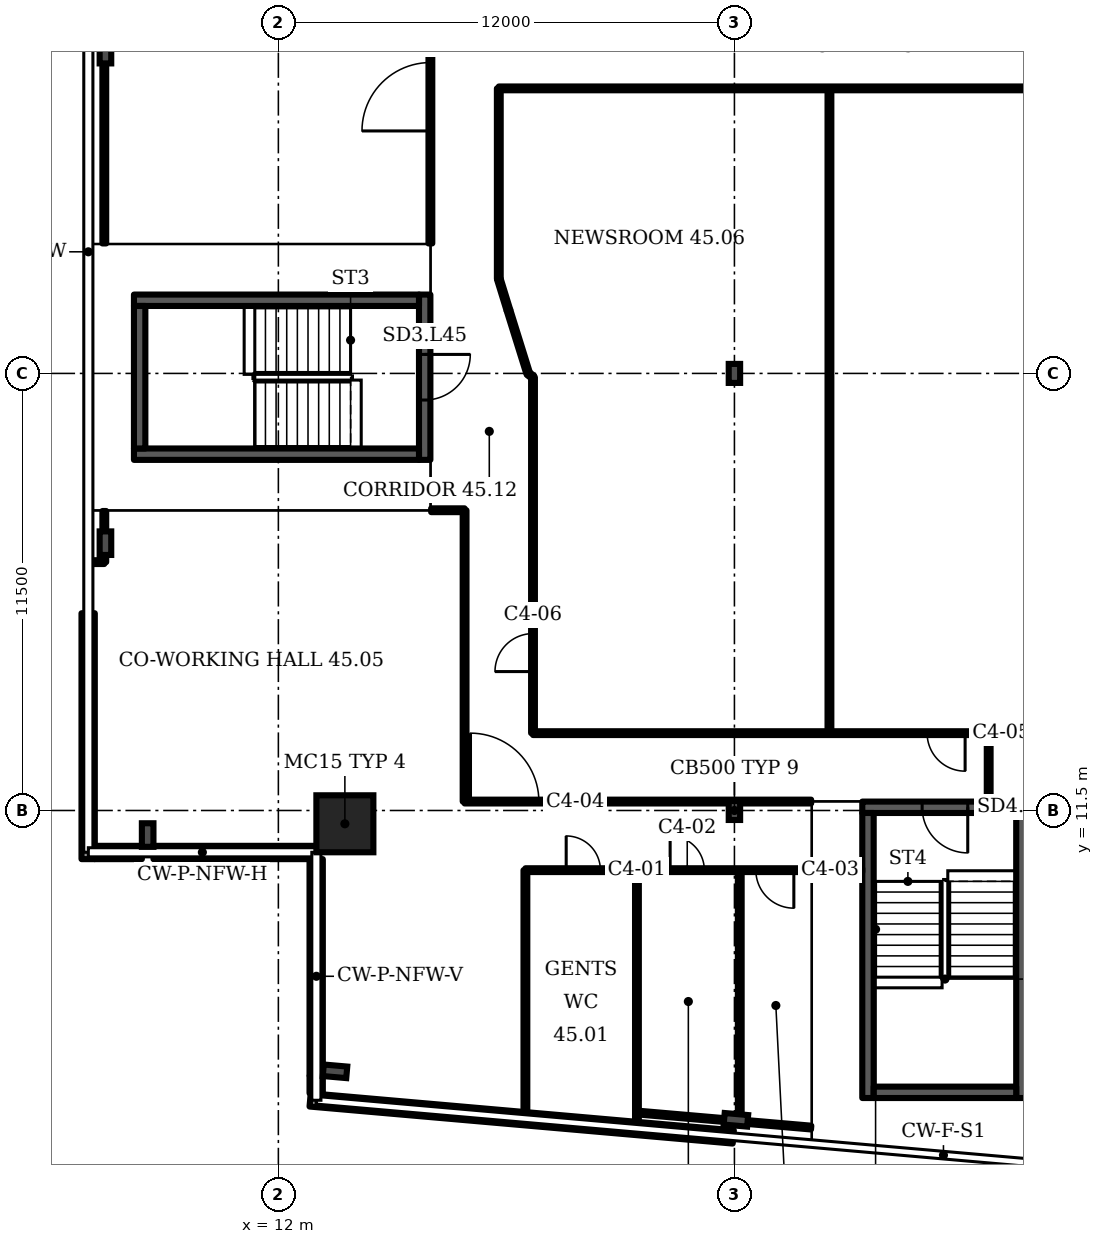
"""IFC4 building model, lengths in metres.
Left out: names, types, materials, properties, quantities, classifications, styles, units other than length and angle.
Written with IfcOpenShell. Run it as: python <this file> out.ifc"""

import sys

from ifc_helpers import new_model, si_unit, direction, frame, frame_2d, origin, origin_2d, place, context, subcontext, project, spatial, rectangle, i_section, extrude, element, fill, save


model = new_model("IFC4")
c1 = context("Model", 3, precision=1e-05, world=origin(), true_north=direction((0.0, 1.0)))
c2 = subcontext(c1, "Body", "Model", "MODEL_VIEW")
j1 = project(units=[si_unit("LENGTHUNIT", "METRE"), si_unit("PLANEANGLEUNIT", "RADIAN")], contexts=[c1])
p1 = place(None, origin())
s1 = spatial("IfcSite", under=j1, at=p1, CompositionType="ELEMENT")
p2 = place(p1, origin())
s2 = spatial("IfcBuilding", under=s1, at=p2, CompositionType="ELEMENT")
p3 = place(p2, frame((0.0, 0.0, 184.3)))
s3 = spatial("IfcBuildingStorey", under=s2, at=p3, CompositionType="ELEMENT", Elevation=184.3)
p4 = place(p3, frame((13.75, 11.15, 0.0), z_axis=(0.0, 0.0, 1.0), x_axis=(1.0, 0.0, 0.0)))
e1 = element("IfcColumn", 1, at=p4, inside=s3, PredefinedType="COLUMN", context=c2, shape_type="SweptSolid", body=[
    extrude(rectangle(XDim=1.5, YDim=1.5, at=origin_2d()), origin(), (0.0, 0.0, 1.0), 3.6),
])
for number, where, z_axis, x_axis in (
    (2, (13.491, 4.637, 0.0), (0.0, 0.0, 1.0), (-0.087, -0.996, 0.0)),
    (3, (24.039, 3.361, 0.0), (0.0, 0.0, 1.0), (-0.087, -0.996, 0.0)),
    (4, (7.45, 31.467, 0.0), (0.0, 0.0, 1.0), (-1.0, 0.0, 0.0)),
    (5, (7.45, 18.533, 0.0), (0.0, 0.0, 1.0), (-1.0, 0.0, 0.0)),
    (6, (8.561, 10.854, 0.0), (0.0, 0.0, 1.0), (-1.0, 0.0, 0.0)),
):
    element("IfcColumn", number, at=place(p3, frame(where, z_axis=z_axis, x_axis=x_axis)), inside=s3, PredefinedType="COLUMN", context=c2, shape_type="SweptSolid", body=[
        extrude(i_section(OverallWidth=0.305, OverallDepth=0.62, WebThickness=0.021, FlangeThickness=0.04, FilletRadius=0.027, at=origin_2d()), origin(), (0.0, 0.0, 1.0), 3.6),
    ])
for number, where, z_axis, x_axis in (
    (7, (24.0, 11.5, 0.0), (0.0, 0.0, 1.0), (1.0, 0.0, 0.0)),
    (8, (24.0, 23.0, 0.0), (0.0, 0.0, 1.0), (1.0, 0.0, 0.0)),
):
    element("IfcColumn", number, at=place(p3, frame(where, z_axis=z_axis, x_axis=x_axis)), inside=s3, PredefinedType="COLUMN", context=c2, shape_type="SweptSolid", body=[
        extrude(i_section(OverallWidth=0.3, OverallDepth=0.5, WebThickness=0.014, FlangeThickness=0.028, FilletRadius=0.027, at=origin_2d()), origin(), (0.0, 0.0, 1.0), 3.6),
    ])
p5 = place(p3, frame((12.835, 3.885, 0.0), z_axis=(0.0, 0.0, 1.0), x_axis=(0.996199, -0.087154, 0.0)))
e9 = element("IfcWall", 9, at=p5, inside=s3, PredefinedType="SOLIDWALL", context=c2, shape_type="SweptSolid", body=[
    extrude(rectangle(XDim=11.177, YDim=0.35, at=frame_2d((5.588, 0.0))), origin(), (0.0, 0.0, 1.0), 1.0),
])
p6 = place(p3, frame((6.995, 16.69, 0.0), z_axis=(0.0, 0.0, 1.0), x_axis=(0.0, -1.0, 0.0)))
e10 = element("IfcWall", 10, at=p6, inside=s3, PredefinedType="SOLIDWALL", context=c2, shape_type="SweptSolid", body=[
    extrude(rectangle(XDim=6.47, YDim=0.35, at=frame_2d((3.235, 0.0))), origin(), (0.0, 0.0, 1.0), 1.0),
])
p7 = place(p3, frame((7.17, 10.395, 0.0), z_axis=(0.0, 0.0, 1.0), x_axis=(1.0, 0.0, 0.0)))
e11 = element("IfcWall", 11, at=p7, inside=s3, PredefinedType="SOLIDWALL", context=c2, shape_type="SweptSolid", body=[
    extrude(rectangle(XDim=1.238, YDim=0.35, at=frame_2d((0.619, 0.0))), origin(), (0.0, 0.0, 1.0), 1.0),
])
p8 = place(p3, frame((8.713, 10.395, 0.0), z_axis=(0.0, 0.0, 1.0), x_axis=(1.0, 0.0, 0.0)))
e12 = element("IfcWall", 12, at=p8, inside=s3, PredefinedType="SOLIDWALL", context=c2, shape_type="SweptSolid", body=[
    extrude(rectangle(XDim=4.287, YDim=0.35, at=frame_2d((2.143, 0.0))), origin(), (0.0, 0.0, 1.0), 1.0),
])
p9 = place(p3, frame((12.995, 10.22, 0.0), z_axis=(0.0, 0.0, 1.0), x_axis=(0.0, -1.0, 0.0)))
e13 = element("IfcWall", 13, at=p9, inside=s3, PredefinedType="SOLIDWALL", context=c2, shape_type="SweptSolid", body=[
    extrude(rectangle(XDim=5.693, YDim=0.35, at=frame_2d((2.847, 0.0))), origin(), (0.0, 0.0, 1.0), 1.0),
])
p10 = place(p3, frame((12.995, 4.512, 0.0), z_axis=(0.0, 0.0, 1.0), x_axis=(0.0, -1.0, 0.0)))
e14 = element("IfcWall", 14, at=p10, inside=s3, PredefinedType="SOLIDWALL", context=c2, shape_type="SweptSolid", body=[
    extrude(rectangle(XDim=0.454, YDim=0.35, at=frame_2d((0.227, 0.0))), origin(), (0.0, 0.0, 1.0), 1.0),
])
p11 = place(p3, frame((15.85, 20.725, 0.0), z_axis=(0.0, 0.0, 1.0), x_axis=(0.0, 1.0, 0.0)))
e15 = element("IfcWall", 15, at=p11, inside=s3, PredefinedType="SHEAR", context=c2, shape_type="SweptSolid", body=[
    extrude(rectangle(XDim=4.35, YDim=0.3, at=frame_2d((2.175, 0.0))), origin(), (0.0, 0.0, 1.0), 3.2),
])
p12 = place(p11, frame((1.575, 0.0, 0.0)))
e16 = element("IfcOpeningElement", 16, at=p12, cuts=e15, PredefinedType="OPENING", context=c2, shape_type="SweptSolid", body=[
    extrude(rectangle(XDim=1.2, YDim=2.1, at=frame_2d((0.6, 1.05))), frame((0.0, 0.16, 0.0), z_axis=(0.0, -1.0, 0.0), x_axis=(1.0, 0.0, 0.0)), (0.0, 0.0, 1.0), 0.32),
])
p13 = place(p3, frame((27.364, 11.584, 0.0), z_axis=(0.0, 0.0, 1.0), x_axis=(1.0, 0.0, 0.0)))
e17 = element("IfcWall", 17, at=p13, inside=s3, PredefinedType="SHEAR", context=c2, shape_type="SweptSolid", body=[
    extrude(rectangle(XDim=4.35, YDim=0.3, at=frame_2d((2.175, 0.0))), origin(), (0.0, 0.0, 1.0), 3.2),
])
p14 = place(p13, frame((1.575, 0.0, 0.0)))
e18 = element("IfcOpeningElement", 18, at=p14, cuts=e17, PredefinedType="OPENING", context=c2, shape_type="SweptSolid", body=[
    extrude(rectangle(XDim=1.2, YDim=2.1, at=frame_2d((0.6, 1.05))), frame((0.0, 0.16, 0.0), z_axis=(0.0, -1.0, 0.0), x_axis=(1.0, 0.0, 0.0)), (0.0, 0.0, 1.0), 0.32),
])
p15 = place(p3, frame((7.02, 18.035, 0.0), z_axis=(0.0, 0.0, 1.0), x_axis=(1.0, 0.0, 0.0)))
e19 = element("IfcWall", 19, at=p15, inside=s3, PredefinedType="PARTITIONING", context=c2, shape_type="SweptSolid", body=[
    extrude(rectangle(XDim=0.4, YDim=0.1, at=frame_2d((0.2, 0.0))), origin(), (0.0, 0.0, 1.0), 3.2),
])
p16 = place(p3, frame((7.42, 18.035, 0.0), z_axis=(0.0, 0.0, 1.0), x_axis=(0.0, 1.0, 0.0)))
e20 = element("IfcWall", 20, at=p16, inside=s3, PredefinedType="PARTITIONING", context=c2, shape_type="SweptSolid", body=[
    extrude(rectangle(XDim=1.345, YDim=0.1, at=frame_2d((0.672, 0.0))), origin(), (0.0, 0.0, 1.0), 2.58),
])
p17 = place(p3, frame((7.42, 26.42, 0.0), z_axis=(0.0, 0.0, 1.0), x_axis=(0.0, 1.0, 0.0)))
e21 = element("IfcWall", 21, at=p17, inside=s3, PredefinedType="PARTITIONING", context=c2, shape_type="SweptSolid", body=[
    extrude(rectangle(XDim=15.56, YDim=0.1, at=frame_2d((7.78, 0.0))), origin(), (0.0, 0.0, 1.0), 2.58),
])
p18 = place(p3, frame((16.0, 26.42, 0.0), z_axis=(0.0, 0.0, 1.0), x_axis=(0.0, 1.0, 0.0)))
e22 = element("IfcWall", 22, at=p18, inside=s3, PredefinedType="PARTITIONING", context=c2, shape_type="SweptSolid", body=[
    extrude(rectangle(XDim=7.56, YDim=0.1, at=frame_2d((3.78, 0.0))), origin(), (0.0, 0.0, 1.0), 3.2),
])
p19 = place(p18, frame((2.96, 0.0, 0.0)))
e23 = element("IfcOpeningElement", 23, at=p19, cuts=e22, PredefinedType="OPENING", context=c2, shape_type="SweptSolid", body=[
    extrude(rectangle(XDim=1.8, YDim=2.1, at=frame_2d((0.9, 1.05))), frame((0.0, 0.06, 0.0), z_axis=(0.0, -1.0, 0.0), x_axis=(1.0, 0.0, 0.0)), (0.0, 0.0, 1.0), 0.12),
])
p20 = place(p3, frame((16.02, 19.4, 0.0), z_axis=(0.0, 0.0, 1.0), x_axis=(1.0, 0.0, 0.0)))
e24 = element("IfcWall", 24, at=p20, inside=s3, PredefinedType="PARTITIONING", context=c2, shape_type="SweptSolid", body=[
    extrude(rectangle(XDim=0.88, YDim=0.1, at=frame_2d((0.44, 0.0))), origin(), (0.0, 0.0, 1.0), 3.2),
])
p21 = place(p3, frame((16.9, 11.735, 0.0), z_axis=(0.0, 0.0, 1.0), x_axis=(0.0, 1.0, 0.0)))
e25 = element("IfcWall", 25, at=p21, inside=s3, PredefinedType="PARTITIONING", context=c2, shape_type="SweptSolid", body=[
    extrude(rectangle(XDim=7.665, YDim=0.1, at=frame_2d((3.833, 0.0))), origin(), (0.0, 0.0, 1.0), 3.2),
])
p22 = place(p3, frame((16.9, 11.735, 0.0), z_axis=(0.0, 0.0, 1.0), x_axis=(1.0, 0.0, 0.0)))
e26 = element("IfcWall", 26, at=p22, inside=s3, PredefinedType="PARTITIONING", context=c2, shape_type="SweptSolid", body=[
    extrude(rectangle(XDim=9.119, YDim=0.1, at=frame_2d((4.56, 0.0))), origin(), (0.0, 0.0, 1.0), 3.2),
])
p23 = place(p22, frame((0.155, 0.0, 0.0)))
e27 = element("IfcOpeningElement", 27, at=p23, cuts=e26, PredefinedType="OPENING", context=c2, shape_type="SweptSolid", body=[
    extrude(rectangle(XDim=1.8, YDim=2.1, at=frame_2d((0.9, 1.05))), frame((0.0, 0.06, 0.0), z_axis=(0.0, -1.0, 0.0), x_axis=(1.0, 0.0, 0.0)), (0.0, 0.0, 1.0), 0.12),
])
p24 = place(p3, frame((17.8, 25.485, 0.0), z_axis=(0.0, 0.0, 1.0), x_axis=(0.0, 1.0, 0.0)))
e28 = element("IfcWall", 28, at=p24, inside=s3, PredefinedType="PARTITIONING", context=c2, shape_type="SweptSolid", body=[
    extrude(rectangle(XDim=5.015, YDim=0.1, at=frame_2d((2.507, 0.0))), origin(), (0.0, 0.0, 1.0), 3.2),
])
p25 = place(p3, frame((17.8, 30.5, 0.0), z_axis=(0.0, 0.0, 1.0), x_axis=(1.0, 0.0, 0.0)))
e29 = element("IfcWall", 29, at=p25, inside=s3, PredefinedType="PARTITIONING", context=c2, shape_type="SweptSolid", body=[
    extrude(rectangle(XDim=19.05, YDim=0.1, at=frame_2d((9.525, 0.0))), origin(), (0.0, 0.0, 1.0), 3.2),
])
p26 = place(p3, frame((18.055, 24.66, 0.0), z_axis=(0.0, 0.0, 1.0), x_axis=(-0.295119, 0.955462, 0.0)))
e30 = element("IfcWall", 30, at=p26, inside=s3, PredefinedType="PARTITIONING", context=c2, shape_type="SweptSolid", body=[
    extrude(rectangle(XDim=0.864, YDim=0.1, at=frame_2d((0.432, 0.0))), origin(), (0.0, 0.0, 1.0), 3.2),
])
p27 = place(p3, frame((18.5, 3.414, 0.0), z_axis=(0.0, 0.0, 1.0), x_axis=(0.0, 1.0, 0.0)))
e31 = element("IfcWall", 31, at=p27, inside=s3, PredefinedType="PARTITIONING", context=c2, shape_type="SweptSolid", body=[
    extrude(rectangle(XDim=6.516, YDim=0.1, at=frame_2d((3.258, 0.0))), origin(), (0.0, 0.0, 1.0), 2.58),
])
p28 = place(p3, frame((18.5, 9.93, 0.0), z_axis=(0.0, 0.0, 1.0), x_axis=(1.0, 0.0, 0.0)))
e32 = element("IfcWall", 32, at=p28, inside=s3, PredefinedType="PARTITIONING", context=c2, shape_type="SweptSolid", body=[
    extrude(rectangle(XDim=8.864, YDim=0.1, at=frame_2d((4.432, 0.0))), origin(), (0.0, 0.0, 1.0), 3.2),
])
p29 = place(p28, frame((1.073, 0.0, 0.0)))
e33 = element("IfcOpeningElement", 33, at=p29, cuts=e32, PredefinedType="OPENING", context=c2, shape_type="SweptSolid", body=[
    extrude(rectangle(XDim=0.9, YDim=2.1, at=frame_2d((0.45, 1.05))), frame((0.0, 0.06, 0.0), z_axis=(0.0, -1.0, 0.0), x_axis=(1.0, 0.0, 0.0)), (0.0, 0.0, 1.0), 0.12),
])
p30 = place(p28, frame((3.808, 0.0, 0.0)))
e34 = element("IfcOpeningElement", 34, at=p30, cuts=e32, PredefinedType="OPENING", context=c2, shape_type="SweptSolid", body=[
    extrude(rectangle(XDim=0.9, YDim=2.1, at=frame_2d((0.45, 1.05))), frame((0.0, 0.06, 0.0), z_axis=(0.0, -1.0, 0.0), x_axis=(1.0, 0.0, 0.0)), (0.0, 0.0, 1.0), 0.12),
])
p31 = place(p28, frame((6.063, 0.0, 0.0)))
e35 = element("IfcOpeningElement", 35, at=p31, cuts=e32, PredefinedType="OPENING", context=c2, shape_type="SweptSolid", body=[
    extrude(rectangle(XDim=1.0, YDim=2.1, at=frame_2d((0.5, 1.05))), frame((0.0, 0.06, 0.0), z_axis=(0.0, -1.0, 0.0), x_axis=(1.0, 0.0, 0.0)), (0.0, 0.0, 1.0), 0.12),
])
p32 = place(p3, frame((18.575, 22.995, 0.0), z_axis=(0.0, 0.0, 1.0), x_axis=(-0.298155, 0.954516, 0.0)))
e36 = element("IfcWall", 36, at=p32, inside=s3, PredefinedType="PARTITIONING", context=c2, shape_type="SweptSolid", body=[
    extrude(rectangle(XDim=1.744, YDim=0.1, at=frame_2d((0.872, 0.0))), origin(), (0.0, 0.0, 1.0), 3.2),
])
p33 = place(p3, frame((18.7, 22.9, 0.0), z_axis=(0.0, 0.0, 1.0), x_axis=(-0.795501, 0.605948, 0.0)))
e37 = element("IfcWall", 37, at=p33, inside=s3, PredefinedType="PARTITIONING", context=c2, shape_type="SweptSolid", body=[
    extrude(rectangle(XDim=0.157, YDim=0.1, at=frame_2d((0.079, 0.0))), origin(), (0.0, 0.0, 1.0), 3.2),
])
p34 = place(p3, frame((18.7, 13.535, 0.0), z_axis=(0.0, 0.0, 1.0), x_axis=(0.0, 1.0, 0.0)))
e38 = element("IfcWall", 38, at=p34, inside=s3, PredefinedType="PARTITIONING", context=c2, shape_type="SweptSolid", body=[
    extrude(rectangle(XDim=9.365, YDim=0.1, at=frame_2d((4.683, 0.0))), origin(), (0.0, 0.0, 1.0), 3.2),
])
p35 = place(p34, frame((1.62, 0.0, 0.0)))
e39 = element("IfcOpeningElement", 39, at=p35, cuts=e38, PredefinedType="OPENING", context=c2, shape_type="SweptSolid", body=[
    extrude(rectangle(XDim=1.0, YDim=2.1, at=frame_2d((0.5, 1.05))), frame((0.0, 0.06, 0.0), z_axis=(0.0, -1.0, 0.0), x_axis=(1.0, 0.0, 0.0)), (0.0, 0.0, 1.0), 0.12),
])
p36 = place(p3, frame((18.7, 13.535, 0.0), z_axis=(0.0, 0.0, 1.0), x_axis=(1.0, 0.0, 0.0)))
e40 = element("IfcWall", 40, at=p36, inside=s3, PredefinedType="PARTITIONING", context=c2, shape_type="SweptSolid", body=[
    extrude(rectangle(XDim=11.99, YDim=0.1, at=frame_2d((5.995, 0.0))), origin(), (0.0, 0.0, 1.0), 3.2),
])
p37 = place(p36, frame((10.37, 0.0, 0.0)))
e41 = element("IfcOpeningElement", 41, at=p37, cuts=e40, PredefinedType="OPENING", context=c2, shape_type="SweptSolid", body=[
    extrude(rectangle(XDim=1.0, YDim=2.1, at=frame_2d((0.5, 1.05))), frame((0.0, 0.06, 0.0), z_axis=(0.0, -1.0, 0.0), x_axis=(1.0, 0.0, 0.0)), (0.0, 0.0, 1.0), 0.12),
])
p38 = place(p3, frame((21.435, 3.165, 0.0), z_axis=(0.0, 0.0, 1.0), x_axis=(0.0, 1.0, 0.0)))
e42 = element("IfcWall", 42, at=p38, inside=s3, PredefinedType="PARTITIONING", context=c2, shape_type="SweptSolid", body=[
    extrude(rectangle(XDim=6.765, YDim=0.1, at=frame_2d((3.382, 0.0))), origin(), (0.0, 0.0, 1.0), 2.58),
])
p39 = place(p3, frame((24.14, 3.32, 0.0), z_axis=(0.0, 0.0, 1.0), x_axis=(0.0, 1.0, 0.0)))
e43 = element("IfcWall", 43, at=p39, inside=s3, PredefinedType="PARTITIONING", context=c2, shape_type="SweptSolid", body=[
    extrude(rectangle(XDim=6.61, YDim=0.1, at=frame_2d((3.305, 0.0))), origin(), (0.0, 0.0, 1.0), 3.2),
])
p40 = place(p3, frame((26.019, 3.157, 0.0), z_axis=(0.0, 0.0, 1.0), x_axis=(-0.996266, 0.086322, 0.0)))
e44 = element("IfcWall", 44, at=p40, inside=s3, PredefinedType="PARTITIONING", context=c2, shape_type="SweptSolid", body=[
    extrude(rectangle(XDim=4.556, YDim=0.1, at=frame_2d((2.278, 0.0))), origin(), (0.0, 0.0, 1.0), 2.58),
])
p41 = place(p3, frame((26.5, 13.535, 0.0), z_axis=(0.0, 0.0, 1.0), x_axis=(0.0, 1.0, 0.0)))
e45 = element("IfcWall", 45, at=p41, inside=s3, PredefinedType="PARTITIONING", context=c2, shape_type="SweptSolid", body=[
    extrude(rectangle(XDim=16.965, YDim=0.1, at=frame_2d((8.482, 0.0))), origin(), (0.0, 0.0, 1.0), 3.2),
])
p42 = place(p3, frame((30.69, 11.754, 0.0), z_axis=(0.0, 0.0, 1.0), x_axis=(0.0, 1.0, 0.0)))
e46 = element("IfcWall", 46, at=p42, inside=s3, PredefinedType="PARTITIONING", context=c2, shape_type="SweptSolid", body=[
    extrude(rectangle(XDim=1.781, YDim=0.1, at=frame_2d((0.89, 0.0))), origin(), (0.0, 0.0, 1.0), 3.2),
])
for number, where, z_axis, x_axis in (
    (47, (8.2, 20.875, 0.0), (0.0, 0.0, 1.0), (1.0, 0.0, 0.0)),
    (48, (8.2, 24.925, 0.0), (0.0, 0.0, 1.0), (1.0, 0.0, 0.0)),
):
    element("IfcWall", number, at=place(p3, frame(where, z_axis=z_axis, x_axis=x_axis)), inside=s3, PredefinedType="SHEAR", context=c2, shape_type="SweptSolid", body=[
        extrude(rectangle(XDim=7.5, YDim=0.3, at=frame_2d((3.75, 0.0))), origin(), (0.0, 0.0, 1.0), 3.2),
    ])
p43 = place(p3, frame((8.35, 21.025, 0.0), z_axis=(0.0, 0.0, 1.0), x_axis=(0.0, 1.0, 0.0)))
e49 = element("IfcWall", 49, at=p43, inside=s3, PredefinedType="SHEAR", context=c2, shape_type="SweptSolid", body=[
    extrude(rectangle(XDim=3.75, YDim=0.3, at=frame_2d((1.875, 0.0))), origin(), (0.0, 0.0, 1.0), 3.2),
])
for number, where, z_axis, x_axis in (
    (50, (27.514, 3.934, 0.0), (0.0, 0.0, 1.0), (0.0, 1.0, 0.0)),
    (51, (31.564, 3.934, 0.0), (0.0, 0.0, 1.0), (0.0, 1.0, 0.0)),
):
    element("IfcWall", number, at=place(p3, frame(where, z_axis=z_axis, x_axis=x_axis)), inside=s3, PredefinedType="SHEAR", context=c2, shape_type="SweptSolid", body=[
        extrude(rectangle(XDim=7.5, YDim=0.3, at=frame_2d((3.75, 0.0))), origin(), (0.0, 0.0, 1.0), 3.2),
    ])
p44 = place(p3, frame((27.664, 4.084, 0.0), z_axis=(0.0, 0.0, 1.0), x_axis=(1.0, 0.0, 0.0)))
e52 = element("IfcWall", 52, at=p44, inside=s3, PredefinedType="SHEAR", context=c2, shape_type="SweptSolid", body=[
    extrude(rectangle(XDim=3.75, YDim=0.3, at=frame_2d((1.875, 0.0))), origin(), (0.0, 0.0, 1.0), 3.2),
])
p45 = place(p12, origin())
e53 = element("IfcDoor", 53, at=p45, inside=s3, OperationType="SINGLE_SWING_RIGHT", PredefinedType="DOOR", context=c2, shape_type="SweptSolid", body=[
    extrude(rectangle(XDim=1.2, YDim=2.1, at=frame_2d((0.6, 1.05))), frame((0.0, 0.025, 0.0), z_axis=(0.0, -1.0, 0.0), x_axis=(1.0, 0.0, 0.0)), (0.0, 0.0, 1.0), 0.05),
])
fill(e16, e53)
p46 = place(p14, origin())
e54 = element("IfcDoor", 54, at=p46, inside=s3, OperationType="SINGLE_SWING_RIGHT", PredefinedType="DOOR", context=c2, shape_type="SweptSolid", body=[
    extrude(rectangle(XDim=1.2, YDim=2.1, at=frame_2d((0.6, 1.05))), frame((0.0, 0.025, 0.0), z_axis=(0.0, -1.0, 0.0), x_axis=(1.0, 0.0, 0.0)), (0.0, 0.0, 1.0), 0.05),
])
fill(e18, e54)
p47 = place(p29, origin())
e55 = element("IfcDoor", 55, at=p47, inside=s3, OperationType="SINGLE_SWING_LEFT", PredefinedType="DOOR", context=c2, shape_type="SweptSolid", body=[
    extrude(rectangle(XDim=0.9, YDim=2.1, at=frame_2d((0.45, 1.05))), frame((0.0, 0.025, 0.0), z_axis=(0.0, -1.0, 0.0), x_axis=(1.0, 0.0, 0.0)), (0.0, 0.0, 1.0), 0.05),
])
fill(e33, e55)
p48 = place(p30, origin())
e56 = element("IfcDoor", 56, at=p48, inside=s3, OperationType="SINGLE_SWING_LEFT", PredefinedType="DOOR", context=c2, shape_type="SweptSolid", body=[
    extrude(rectangle(XDim=0.9, YDim=2.1, at=frame_2d((0.45, 1.05))), frame((0.0, 0.025, 0.0), z_axis=(0.0, -1.0, 0.0), x_axis=(1.0, 0.0, 0.0)), (0.0, 0.0, 1.0), 0.05),
])
fill(e34, e56)
p49 = place(p31, origin())
e57 = element("IfcDoor", 57, at=p49, inside=s3, OperationType="SINGLE_SWING_RIGHT", PredefinedType="DOOR", context=c2, shape_type="SweptSolid", body=[
    extrude(rectangle(XDim=1.0, YDim=2.1, at=frame_2d((0.5, 1.05))), frame((0.0, 0.025, 0.0), z_axis=(0.0, -1.0, 0.0), x_axis=(1.0, 0.0, 0.0)), (0.0, 0.0, 1.0), 0.05),
])
fill(e35, e57)
p50 = place(p23, origin())
e58 = element("IfcDoor", 58, at=p50, inside=s3, OperationType="DOUBLE_DOOR_SINGLE_SWING", PredefinedType="DOOR", context=c2, shape_type="SweptSolid", body=[
    extrude(rectangle(XDim=1.8, YDim=2.1, at=frame_2d((0.9, 1.05))), frame((0.0, 0.025, 0.0), z_axis=(0.0, -1.0, 0.0), x_axis=(1.0, 0.0, 0.0)), (0.0, 0.0, 1.0), 0.05),
])
fill(e27, e58)
p51 = place(p37, origin())
e59 = element("IfcDoor", 59, at=p51, inside=s3, OperationType="SINGLE_SWING_RIGHT", PredefinedType="DOOR", context=c2, shape_type="SweptSolid", body=[
    extrude(rectangle(XDim=1.0, YDim=2.1, at=frame_2d((0.5, 1.05))), frame((0.0, 0.025, 0.0), z_axis=(0.0, -1.0, 0.0), x_axis=(1.0, 0.0, 0.0)), (0.0, 0.0, 1.0), 0.05),
])
fill(e41, e59)
p52 = place(p35, origin())
e60 = element("IfcDoor", 60, at=p52, inside=s3, OperationType="SINGLE_SWING_LEFT", PredefinedType="DOOR", context=c2, shape_type="SweptSolid", body=[
    extrude(rectangle(XDim=1.0, YDim=2.1, at=frame_2d((0.5, 1.05))), frame((0.0, 0.025, 0.0), z_axis=(0.0, -1.0, 0.0), x_axis=(1.0, 0.0, 0.0)), (0.0, 0.0, 1.0), 0.05),
])
fill(e39, e60)
p53 = place(p19, origin())
e61 = element("IfcDoor", 61, at=p53, inside=s3, OperationType="DOUBLE_DOOR_SINGLE_SWING", PredefinedType="DOOR", context=c2, shape_type="SweptSolid", body=[
    extrude(rectangle(XDim=1.8, YDim=2.1, at=frame_2d((0.9, 1.05))), frame((0.0, 0.025, 0.0), z_axis=(0.0, -1.0, 0.0), x_axis=(1.0, 0.0, 0.0)), (0.0, 0.0, 1.0), 0.05),
])
fill(e23, e61)
save(model, sys.argv[1])
